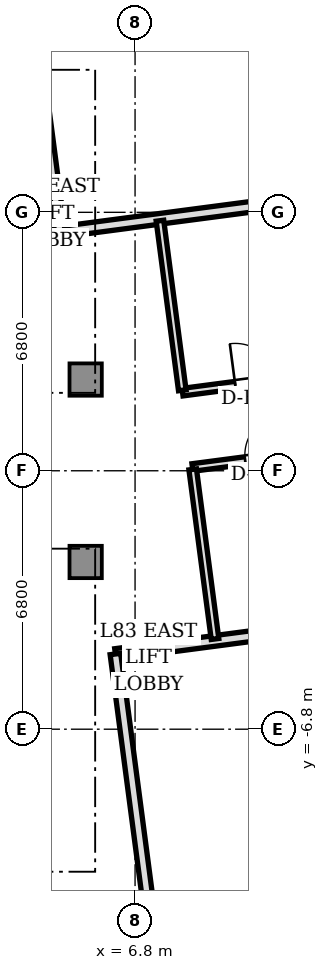
"""IFC4 building model, lengths in metres.
Left out: names, types, materials, properties, quantities, classifications, styles, units other than length and angle.
Written with IfcOpenShell. Run it as: python <this file> out.ifc"""

import sys

from ifc_helpers import new_model, si_unit, direction, frame, frame_2d, origin, origin_2d, place, context, subcontext, project, spatial, polyline, rectangle, outline, extrude, source, transform, mapped, element, fill, save


model = new_model("IFC4")
c1 = context("Model", 3, precision=1e-05, world=origin(), true_north=direction((0.0, 1.0)))
c2 = subcontext(c1, "Body", "Model", "MODEL_VIEW")
j1 = project(units=[si_unit("LENGTHUNIT", "METRE"), si_unit("PLANEANGLEUNIT", "RADIAN")], contexts=[c1])
p1 = place(None, origin())
s1 = spatial("IfcSite", under=j1, at=p1, CompositionType="ELEMENT")
p2 = place(p1, origin())
s2 = spatial("IfcBuilding", under=s1, at=p2, CompositionType="ELEMENT")
p3 = place(p2, frame((0.0, 0.0, 300.3)))
s3 = spatial("IfcBuildingStorey", under=s2, at=p3, CompositionType="ELEMENT", Elevation=300.3)
m1 = source(origin(), c2, "Body", "SweptSolid", [
    extrude(rectangle(XDim=0.85, YDim=0.85, at=origin_2d()), origin(), (0.0, 0.0, 1.0), 4.25),
])
for number, where, z_axis, x_axis in (
    (1, (5.5, 2.4, 0.0), (0.0, 0.0, 1.0), (1.0, 0.0, 0.0)),
    (2, (5.5, -2.4, 0.0), (0.0, 0.0, 1.0), (1.0, 0.0, 0.0)),
):
    element("IfcColumn", number, at=place(p3, frame(where, z_axis=z_axis, x_axis=x_axis)), inside=s3, PredefinedType="COLUMN", context=c2, shape_type="MappedRepresentation", body=[
        mapped(m1, transform((0.0, 0.0, 0.0), scale=1.0)),
    ])
p4 = place(p3, frame((6.283, -4.821, 0.0), z_axis=(0.0, 0.0, 1.0), x_axis=(0.991445499165, 0.130521347626, 0.0)))
e3 = element("IfcWall", 3, at=p4, inside=s3, PredefinedType="SOLIDWALL", context=c2, shape_type="SweptSolid", body=[
    extrude(outline(polyline([(0.0, 0.0), (11.15, 0.0), (11.15, 18.529), (0.0, 14.175), (0.0, 0.0)])), frame((0.0, 0.14, 0.0), z_axis=(0.0, -1.0, 0.0), x_axis=(1.0, 0.0, 0.0)), (0.0, 0.0, 1.0), 0.28),
])
p5 = place(p3, frame((15.876, 7.738, 0.0), z_axis=(0.0, 0.0, 1.0), x_axis=(-0.991445499165, -0.130521347626, 0.0)))
e4 = element("IfcWall", 4, at=p5, inside=s3, PredefinedType="SOLIDWALL", context=c2, shape_type="SweptSolid", body=[
    extrude(outline(polyline([(0.0, 0.0), (11.15, 0.0), (11.15, 13.599), (0.0, 17.954), (0.0, 0.0)])), frame((0.0, 0.14, 0.0), z_axis=(0.0, -1.0, 0.0), x_axis=(1.0, 0.0, 0.0)), (0.0, 0.0, 1.0), 0.28),
])
p6 = place(p3, frame((4.821, 6.283, 0.0), z_axis=(0.0, 0.0, 1.0), x_axis=(-0.130521347626, 0.991445499165, 0.0)))
e5 = element("IfcWall", 5, at=p6, inside=s3, PredefinedType="SOLIDWALL", context=c2, shape_type="SweptSolid", body=[
    extrude(outline(polyline([(0.0, 0.0), (11.15, 0.0), (11.15, 13.026), (0.0, 13.599), (0.0, 0.0)])), frame((0.0, 0.14, 0.0), z_axis=(0.0, -1.0, 0.0), x_axis=(1.0, 0.0, 0.0)), (0.0, 0.0, 1.0), 0.28),
])
p7 = place(p3, frame((7.738, -15.876, 0.0), z_axis=(0.0, 0.0, 1.0), x_axis=(-0.130521347626, 0.991445499165, 0.0)))
e6 = element("IfcWall", 6, at=p7, inside=s3, PredefinedType="SOLIDWALL", context=c2, shape_type="SweptSolid", body=[
    extrude(outline(polyline([(0.0, 0.0), (11.15, 0.0), (11.15, 14.175), (0.0, 14.748), (0.0, 0.0)])), frame((0.0, 0.14, 0.0), z_axis=(0.0, -1.0, 0.0), x_axis=(1.0, 0.0, 0.0)), (0.0, 0.0, 1.0), 0.28),
])
p8 = place(p3, frame((8.049, 2.068, 0.0), z_axis=(0.0, 0.0, 1.0), x_axis=(0.991445353075, 0.130522457324, 0.0)))
e7 = element("IfcWall", 7, at=p8, inside=s3, PredefinedType="SOLIDWALL", context=c2, shape_type="SweptSolid", body=[
    extrude(rectangle(XDim=7.25, YDim=0.2, at=frame_2d((3.625, 0.0))), origin(), (0.0, 0.0, 1.0), 3.7),
])
p9 = place(p8, frame((1.4, 0.0, 0.0)))
e8 = element("IfcOpeningElement", 8, at=p9, cuts=e7, PredefinedType="OPENING", context=c2, shape_type="SweptSolid", body=[
    extrude(rectangle(XDim=1.1, YDim=2.15, at=frame_2d((0.55, 1.075))), frame((0.0, 0.11, 0.0), z_axis=(0.0, -1.0, 0.0), x_axis=(1.0, 0.0, 0.0)), (0.0, 0.0, 1.0), 0.22),
])
p10 = place(p3, frame((8.042, 2.118, 0.0), z_axis=(0.0, 0.0, 1.0), x_axis=(-0.130535912089, 0.99144358168, 0.0)))
e9 = element("IfcWall", 9, at=p10, inside=s3, PredefinedType="SOLIDWALL", context=c2, shape_type="SweptSolid", body=[
    extrude(rectangle(XDim=4.5, YDim=0.2, at=frame_2d((2.25, 0.0))), origin(), (0.0, 0.0, 1.0), 3.7),
])
p11 = place(p3, frame((8.31, 0.085, 0.0), z_axis=(0.0, 0.0, 1.0), x_axis=(0.991445353075, 0.130522457324, 0.0)))
e10 = element("IfcWall", 10, at=p11, inside=s3, PredefinedType="SOLIDWALL", context=c2, shape_type="SweptSolid", body=[
    extrude(rectangle(XDim=7.25, YDim=0.2, at=frame_2d((3.625, 0.0))), origin(), (0.0, 0.0, 1.0), 3.7),
])
p12 = place(p11, frame((1.4, 0.0, 0.0)))
e11 = element("IfcOpeningElement", 11, at=p12, cuts=e10, PredefinedType="OPENING", context=c2, shape_type="SweptSolid", body=[
    extrude(rectangle(XDim=1.1, YDim=2.15, at=frame_2d((0.55, 1.075))), frame((0.0, 0.11, 0.0), z_axis=(0.0, -1.0, 0.0), x_axis=(1.0, 0.0, 0.0)), (0.0, 0.0, 1.0), 0.22),
])
p13 = place(p3, frame((8.904, -4.426, 0.0), z_axis=(0.0, 0.0, 1.0), x_axis=(-0.130528890923, 0.991444506079, 0.0)))
e12 = element("IfcWall", 12, at=p13, inside=s3, PredefinedType="SOLIDWALL", context=c2, shape_type="SweptSolid", body=[
    extrude(rectangle(XDim=4.5, YDim=0.2, at=frame_2d((2.25, 0.0))), origin(), (0.0, 0.0, 1.0), 3.7),
])
m2 = source(origin(), c2, "Body", "SweptSolid", [
    extrude(rectangle(XDim=1.1, YDim=0.05, at=origin_2d()), origin(), (0.0, 0.0, 1.0), 2.15),
])
p14 = place(p9, frame((0.55, 0.0, 0.0)))
e13 = element("IfcDoor", 13, at=p14, inside=s3, OperationType="SINGLE_SWING_LEFT", PredefinedType="DOOR", context=c2, shape_type="MappedRepresentation", body=[
    mapped(m2, transform((0.0, 0.0, 0.0), scale=1.0)),
])
fill(e8, e13)
p15 = place(p12, frame((0.55, 0.0, 0.0)))
e14 = element("IfcDoor", 14, at=p15, inside=s3, OperationType="SINGLE_SWING_RIGHT", PredefinedType="DOOR", context=c2, shape_type="MappedRepresentation", body=[
    mapped(m2, transform((0.0, 0.0, 0.0), scale=1.0)),
])
fill(e11, e14)
save(model, sys.argv[1])
